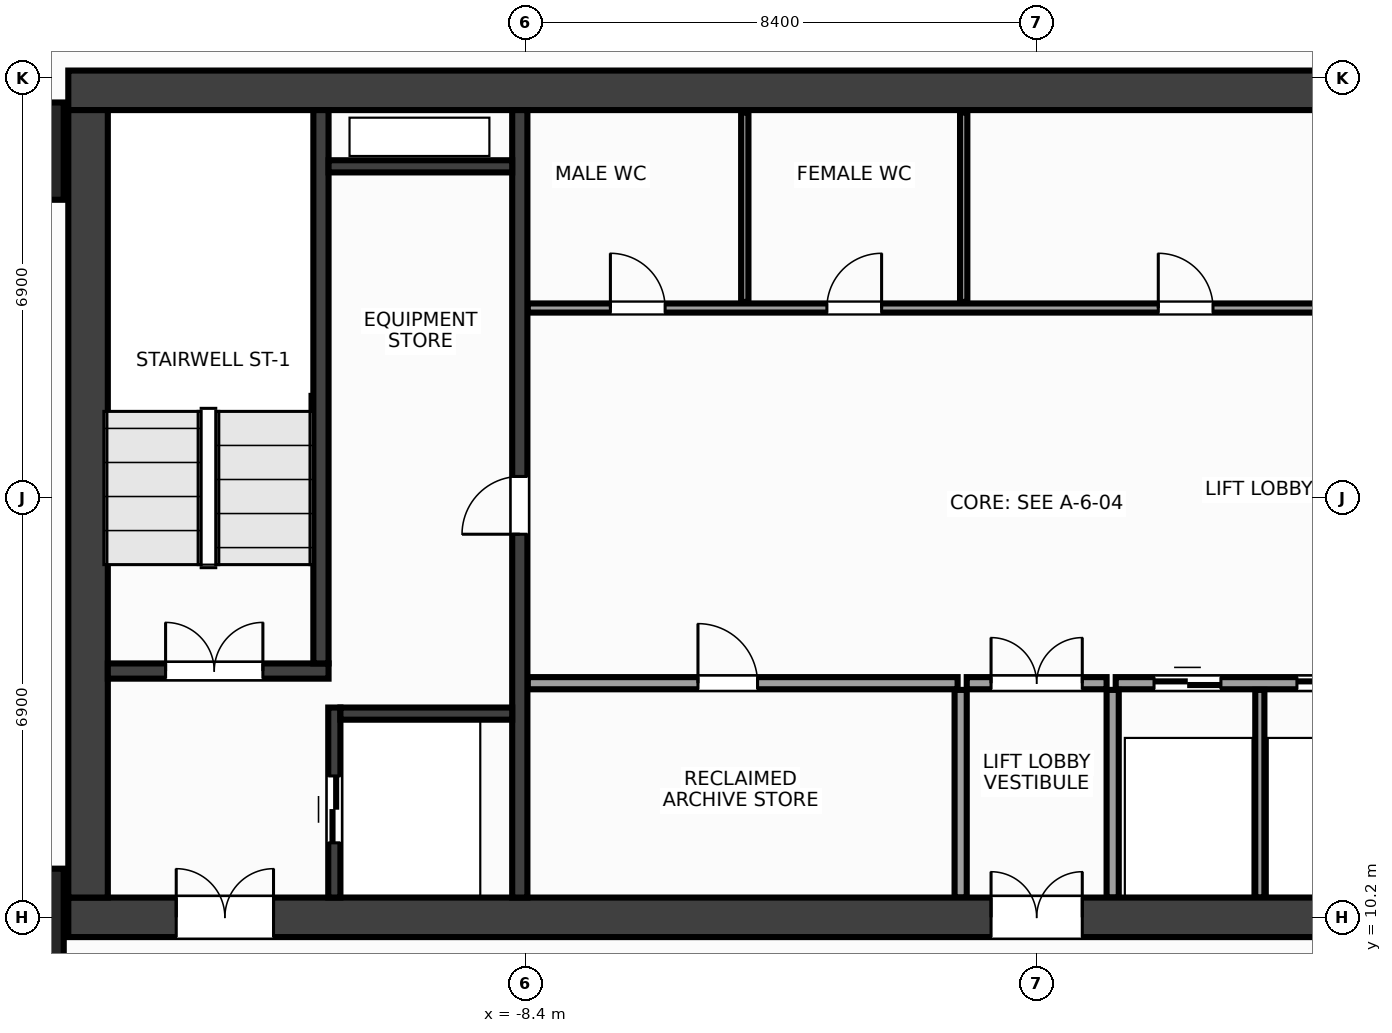
"""IFC4 building model, lengths in metres.
Left out: names, types, materials, properties, quantities, classifications, styles, units other than length and angle.
Written with IfcOpenShell. Run it as: python <this file> out.ifc"""

import sys

from ifc_helpers import new_model, si_unit, direction, frame, frame_2d, origin, origin_2d, place, context, subcontext, project, spatial, rectangle, extrude, source, transform, mapped, element, fill, save


model = new_model("IFC4")
c1 = context("Model", 3, precision=1e-05, world=origin(), true_north=direction((0.0, 1.0)))
c2 = subcontext(c1, "Body", "Model", "MODEL_VIEW")
j1 = project(units=[si_unit("LENGTHUNIT", "METRE"), si_unit("PLANEANGLEUNIT", "RADIAN")], contexts=[c1])
p1 = place(None, origin())
s1 = spatial("IfcSite", under=j1, at=p1, CompositionType="ELEMENT")
p2 = place(p1, origin())
s2 = spatial("IfcBuilding", under=s1, at=p2, CompositionType="ELEMENT")
p3 = place(p2, frame((0.0, 0.0, 102.8)))
s3 = spatial("IfcBuildingStorey", under=s2, at=p3, CompositionType="ELEMENT", Elevation=102.8)
m1 = source(origin(), c2, "Body", "SweptSolid", [
    extrude(rectangle(XDim=31.85, YDim=0.65, at=frame_2d((15.925, 0.0))), origin(), (0.0, 0.0, 1.0), 3.6),
])
p4 = place(p3, frame((-15.925, 23.8, 0.0), z_axis=(0.0, 0.0, 1.0), x_axis=(1.0, 0.0, 0.0)))
e1 = element("IfcWall", 1, at=p4, inside=s3, PredefinedType="SHEAR", context=c2, shape_type="MappedRepresentation", body=[
    mapped(m1, transform((0.0, 0.0, 0.0), x_axis=(1.0, 0.0, 0.0), y_axis=(0.0, 1.0, 0.0), z_axis=(0.0, 0.0, 1.0), scale=1.0)),
])
p5 = place(p3, frame((-15.925, 10.2, 0.0), z_axis=(0.0, 0.0, 1.0), x_axis=(1.0, 0.0, 0.0)))
e2 = element("IfcWall", 2, at=p5, inside=s3, PredefinedType="SHEAR", context=c2, shape_type="MappedRepresentation", body=[
    mapped(m1, transform((0.0, 0.0, 0.0), x_axis=(1.0, 0.0, 0.0), y_axis=(0.0, 1.0, 0.0), z_axis=(0.0, 0.0, 1.0), scale=1.0)),
])
p6 = place(p5, frame((1.775, 0.0, 0.0)))
e3 = element("IfcOpeningElement", 3, at=p6, cuts=e2, PredefinedType="OPENING", context=c2, shape_type="SweptSolid", body=[
    extrude(rectangle(XDim=1.6, YDim=2.15, at=frame_2d((0.8, 1.075))), frame((0.0, 0.337, 0.0), z_axis=(0.0, -1.0, 0.0), x_axis=(1.0, 0.0, 0.0)), (0.0, 0.0, 1.0), 0.674),
])
p7 = place(p5, frame((28.475, 0.0, 0.0)))
e4 = element("IfcOpeningElement", 4, at=p7, cuts=e2, PredefinedType="OPENING", context=c2, shape_type="SweptSolid", body=[
    extrude(rectangle(XDim=1.6, YDim=2.15, at=frame_2d((0.8, 1.075))), frame((0.0, 0.337, 0.0), z_axis=(0.0, -1.0, 0.0), x_axis=(1.0, 0.0, 0.0)), (0.0, 0.0, 1.0), 0.674),
])
p8 = place(p5, frame((15.175, 0.0, 0.0)))
e5 = element("IfcOpeningElement", 5, at=p8, cuts=e2, PredefinedType="OPENING", context=c2, shape_type="SweptSolid", body=[
    extrude(rectangle(XDim=1.5, YDim=2.2, at=frame_2d((0.75, 1.1))), frame((0.0, 0.337, 0.0), z_axis=(0.0, -1.0, 0.0), x_axis=(1.0, 0.0, 0.0)), (0.0, 0.0, 1.0), 0.674),
])
m2 = source(origin(), c2, "Body", "SweptSolid", [
    extrude(rectangle(XDim=12.95, YDim=0.65, at=frame_2d((6.475, 0.0))), origin(), (0.0, 0.0, 1.0), 3.6),
])
p9 = place(p3, frame((-15.6, 10.525, 0.0), z_axis=(0.0, 0.0, 1.0), x_axis=(0.0, 1.0, 0.0)))
e6 = element("IfcWall", 6, at=p9, inside=s3, PredefinedType="SHEAR", context=c2, shape_type="MappedRepresentation", body=[
    mapped(m2, transform((0.0, 0.0, 0.0), x_axis=(1.0, 0.0, 0.0), y_axis=(0.0, 1.0, 0.0), z_axis=(0.0, 0.0, 1.0), scale=1.0)),
])
m3 = source(origin(), c2, "Body", "SweptSolid", [
    extrude(rectangle(XDim=12.95, YDim=0.25, at=frame_2d((6.475, 0.0))), origin(), (0.0, 0.0, 1.0), 3.6),
])
p10 = place(p3, frame((-8.5, 10.525, 0.0), z_axis=(0.0, 0.0, 1.0), x_axis=(0.0, 1.0, 0.0)))
e7 = element("IfcWall", 7, at=p10, inside=s3, PredefinedType="SHEAR", context=c2, shape_type="MappedRepresentation", body=[
    mapped(m3, transform((0.0, 0.0, 0.0), x_axis=(1.0, 0.0, 0.0), y_axis=(0.0, 1.0, 0.0), z_axis=(0.0, 0.0, 1.0), scale=1.0)),
])
p11 = place(p10, frame((5.975, 0.0, 0.0)))
e8 = element("IfcOpeningElement", 8, at=p11, cuts=e7, PredefinedType="OPENING", context=c2, shape_type="SweptSolid", body=[
    extrude(rectangle(XDim=0.95, YDim=2.15, at=frame_2d((0.475, 1.075))), frame((0.0, 0.137, 0.0), z_axis=(0.0, -1.0, 0.0), x_axis=(1.0, 0.0, 0.0)), (0.0, 0.0, 1.0), 0.274),
])
m4 = source(origin(), c2, "Body", "SweptSolid", [
    extrude(rectangle(XDim=3.63, YDim=0.25, at=frame_2d((1.815, 0.0))), origin(), (0.0, 0.0, 1.0), 3.6),
])
p12 = place(p3, frame((-15.275, 14.25, 0.0), z_axis=(0.0, 0.0, 1.0), x_axis=(1.0, 0.0, 0.0)))
e9 = element("IfcWall", 9, at=p12, inside=s3, PredefinedType="SHEAR", context=c2, shape_type="MappedRepresentation", body=[
    mapped(m4, transform((0.0, 0.0, 0.0), x_axis=(1.0, 0.0, 0.0), y_axis=(0.0, 1.0, 0.0), z_axis=(0.0, 0.0, 1.0), scale=1.0)),
])
p13 = place(p12, frame((0.95, 0.0, 0.0)))
e10 = element("IfcOpeningElement", 10, at=p13, cuts=e9, PredefinedType="OPENING", context=c2, shape_type="SweptSolid", body=[
    extrude(rectangle(XDim=1.6, YDim=2.15, at=frame_2d((0.8, 1.075))), frame((0.0, 0.137, 0.0), z_axis=(0.0, -1.0, 0.0), x_axis=(1.0, 0.0, 0.0)), (0.0, 0.0, 1.0), 0.274),
])
m5 = source(origin(), c2, "Body", "SweptSolid", [
    extrude(rectangle(XDim=9.1, YDim=0.25, at=frame_2d((4.55, 0.0))), origin(), (0.0, 0.0, 1.0), 3.6),
])
p14 = place(p3, frame((-11.77, 14.375, 0.0), z_axis=(0.0, 0.0, 1.0), x_axis=(0.0, 1.0, 0.0)))
e11 = element("IfcWall", 11, at=p14, inside=s3, PredefinedType="SHEAR", context=c2, shape_type="MappedRepresentation", body=[
    mapped(m5, transform((0.0, 0.0, 0.0), x_axis=(1.0, 0.0, 0.0), y_axis=(0.0, 1.0, 0.0), z_axis=(0.0, 0.0, 1.0), scale=1.0)),
])
m6 = source(origin(), c2, "Body", "SweptSolid", [
    extrude(rectangle(XDim=3.125, YDim=0.2, at=frame_2d((1.562, 0.0))), origin(), (0.0, 0.0, 1.0), 3.6),
])
p15 = place(p3, frame((-11.55, 10.525, 0.0), z_axis=(0.0, 0.0, 1.0), x_axis=(0.0, 1.0, 0.0)))
e12 = element("IfcWall", 12, at=p15, inside=s3, PredefinedType="SHEAR", context=c2, shape_type="MappedRepresentation", body=[
    mapped(m6, transform((0.0, 0.0, 0.0), x_axis=(1.0, 0.0, 0.0), y_axis=(0.0, 1.0, 0.0), z_axis=(0.0, 0.0, 1.0), scale=1.0)),
])
p16 = place(p15, frame((0.9, 0.0, 0.0)))
e13 = element("IfcOpeningElement", 13, at=p16, cuts=e12, PredefinedType="OPENING", context=c2, shape_type="SweptSolid", body=[
    extrude(rectangle(XDim=1.1, YDim=2.15, at=frame_2d((0.55, 1.075))), frame((0.0, 0.112, 0.0), z_axis=(0.0, -1.0, 0.0), x_axis=(1.0, 0.0, 0.0)), (0.0, 0.0, 1.0), 0.224),
])
m7 = source(origin(), c2, "Body", "SweptSolid", [
    extrude(rectangle(XDim=2.825, YDim=0.2, at=frame_2d((1.413, 0.0))), origin(), (0.0, 0.0, 1.0), 3.6),
])
p17 = place(p3, frame((-11.45, 13.55, 0.0), z_axis=(0.0, 0.0, 1.0), x_axis=(1.0, 0.0, 0.0)))
e14 = element("IfcWall", 14, at=p17, inside=s3, PredefinedType="SHEAR", context=c2, shape_type="MappedRepresentation", body=[
    mapped(m7, transform((0.0, 0.0, 0.0), x_axis=(1.0, 0.0, 0.0), y_axis=(0.0, 1.0, 0.0), z_axis=(0.0, 0.0, 1.0), scale=1.0)),
])
m8 = source(origin(), c2, "Body", "SweptSolid", [
    extrude(rectangle(XDim=3.02, YDim=0.2, at=frame_2d((1.51, 0.0))), origin(), (0.0, 0.0, 1.0), 3.6),
])
p18 = place(p3, frame((-11.645, 22.55, 0.0), z_axis=(0.0, 0.0, 1.0), x_axis=(1.0, 0.0, 0.0)))
e15 = element("IfcWall", 15, at=p18, inside=s3, PredefinedType="SHEAR", context=c2, shape_type="MappedRepresentation", body=[
    mapped(m8, transform((0.0, 0.0, 0.0), x_axis=(1.0, 0.0, 0.0), y_axis=(0.0, 1.0, 0.0), z_axis=(0.0, 0.0, 1.0), scale=1.0)),
])
m9 = source(origin(), c2, "Body", "SweptSolid", [
    extrude(rectangle(XDim=1.6, YDim=1.6, at=origin_2d()), origin(), (0.0, 0.0, 1.0), 3.6),
])
for number, where, z_axis, x_axis in (
    (16, (-16.8, 10.2, 0.0), (0.0, 0.0, 1.0), (1.0, 0.0, 0.0)),
    (17, (-16.8, 22.8, 0.0), (0.0, 0.0, 1.0), (1.0, 0.0, 0.0)),
):
    element("IfcColumn", number, at=place(p3, frame(where, z_axis=z_axis, x_axis=x_axis)), inside=s3, PredefinedType="COLUMN", context=c2, shape_type="MappedRepresentation", body=[
        mapped(m9, transform((0.0, 0.0, 0.0), x_axis=(1.0, 0.0, 0.0), y_axis=(0.0, 1.0, 0.0), z_axis=(0.0, 0.0, 1.0), scale=1.0)),
    ])
m10 = source(origin(), c2, "Body", "SweptSolid", [
    extrude(rectangle(XDim=7.07, YDim=0.2, at=frame_2d((3.535, 0.0))), origin(), (0.0, 0.0, 1.0), 3.36),
])
p19 = place(p3, frame((-8.37, 14.05, 0.0), z_axis=(0.0, 0.0, 1.0), x_axis=(1.0, 0.0, 0.0)))
e18 = element("IfcWall", 18, at=p19, inside=s3, PredefinedType="PARTITIONING", context=c2, shape_type="MappedRepresentation", body=[
    mapped(m10, transform((0.0, 0.0, 0.0), x_axis=(1.0, 0.0, 0.0), y_axis=(0.0, 1.0, 0.0), z_axis=(0.0, 0.0, 1.0), scale=1.0)),
])
p20 = place(p19, frame((2.8, 0.0, 0.0)))
e19 = element("IfcOpeningElement", 19, at=p20, cuts=e18, PredefinedType="OPENING", context=c2, shape_type="SweptSolid", body=[
    extrude(rectangle(XDim=0.98, YDim=2.15, at=frame_2d((0.49, 1.075))), frame((0.0, 0.112, 0.0), z_axis=(0.0, -1.0, 0.0), x_axis=(1.0, 0.0, 0.0)), (0.0, 0.0, 1.0), 0.224),
])
p21 = place(p3, frame((1.3, 14.05, 0.0), z_axis=(0.0, 0.0, 1.0), x_axis=(1.0, 0.0, 0.0)))
e20 = element("IfcWall", 20, at=p21, inside=s3, PredefinedType="PARTITIONING", context=c2, shape_type="MappedRepresentation", body=[
    mapped(m10, transform((0.0, 0.0, 0.0), x_axis=(1.0, 0.0, 0.0), y_axis=(0.0, 1.0, 0.0), z_axis=(0.0, 0.0, 1.0), scale=1.0)),
])
p22 = place(p21, frame((0.63, 0.0, 0.0)))
e21 = element("IfcOpeningElement", 21, at=p22, cuts=e20, PredefinedType="OPENING", context=c2, shape_type="SweptSolid", body=[
    extrude(rectangle(XDim=1.1, YDim=2.15, at=frame_2d((0.55, 1.075))), frame((0.0, 0.112, 0.0), z_axis=(0.0, -1.0, 0.0), x_axis=(1.0, 0.0, 0.0)), (0.0, 0.0, 1.0), 0.224),
])
p23 = place(p21, frame((2.98, 0.0, 0.0)))
e22 = element("IfcOpeningElement", 22, at=p23, cuts=e20, PredefinedType="OPENING", context=c2, shape_type="SweptSolid", body=[
    extrude(rectangle(XDim=1.1, YDim=2.15, at=frame_2d((0.55, 1.075))), frame((0.0, 0.112, 0.0), z_axis=(0.0, -1.0, 0.0), x_axis=(1.0, 0.0, 0.0)), (0.0, 0.0, 1.0), 0.224),
])
p24 = place(p21, frame((5.33, 0.0, 0.0)))
e23 = element("IfcOpeningElement", 23, at=p24, cuts=e20, PredefinedType="OPENING", context=c2, shape_type="SweptSolid", body=[
    extrude(rectangle(XDim=1.1, YDim=2.15, at=frame_2d((0.55, 1.075))), frame((0.0, 0.112, 0.0), z_axis=(0.0, -1.0, 0.0), x_axis=(1.0, 0.0, 0.0)), (0.0, 0.0, 1.0), 0.224),
])
m11 = source(origin(), c2, "Body", "SweptSolid", [
    extrude(rectangle(XDim=3.415, YDim=0.2, at=frame_2d((1.708, 0.0))), origin(), (0.0, 0.0, 1.0), 3.36),
])
for number, where, z_axis, x_axis in (
    (24, (-1.25, 10.525, 0.0), (0.0, 0.0, 1.0), (0.0, 1.0, 0.0)),
    (25, (1.25, 10.525, 0.0), (0.0, 0.0, 1.0), (0.0, 1.0, 0.0)),
):
    element("IfcWall", number, at=place(p3, frame(where, z_axis=z_axis, x_axis=x_axis)), inside=s3, PredefinedType="PARTITIONING", context=c2, shape_type="MappedRepresentation", body=[
        mapped(m11, transform((0.0, 0.0, 0.0), x_axis=(1.0, 0.0, 0.0), y_axis=(0.0, 1.0, 0.0), z_axis=(0.0, 0.0, 1.0), scale=1.0)),
    ])
m12 = source(origin(), c2, "Body", "SweptSolid", [
    extrude(rectangle(XDim=2.3, YDim=0.2, at=frame_2d((1.15, 0.0))), origin(), (0.0, 0.0, 1.0), 3.36),
])
p25 = place(p3, frame((-1.15, 14.05, 0.0), z_axis=(0.0, 0.0, 1.0), x_axis=(1.0, 0.0, 0.0)))
e26 = element("IfcWall", 26, at=p25, inside=s3, PredefinedType="PARTITIONING", context=c2, shape_type="MappedRepresentation", body=[
    mapped(m12, transform((0.0, 0.0, 0.0), x_axis=(1.0, 0.0, 0.0), y_axis=(0.0, 1.0, 0.0), z_axis=(0.0, 0.0, 1.0), scale=1.0)),
])
p26 = place(p25, frame((0.4, 0.0, 0.0)))
e27 = element("IfcOpeningElement", 27, at=p26, cuts=e26, PredefinedType="OPENING", context=c2, shape_type="SweptSolid", body=[
    extrude(rectangle(XDim=1.5, YDim=2.2, at=frame_2d((0.75, 1.1))), frame((0.0, 0.112, 0.0), z_axis=(0.0, -1.0, 0.0), x_axis=(1.0, 0.0, 0.0)), (0.0, 0.0, 1.0), 0.224),
])
m13 = source(origin(), c2, "Body", "SweptSolid", [
    extrude(rectangle(XDim=14.59, YDim=0.15, at=frame_2d((7.295, 0.0))), origin(), (0.0, 0.0, 1.0), 3.36),
])
p27 = place(p3, frame((-8.37, 20.22, 0.0), z_axis=(0.0, 0.0, 1.0), x_axis=(1.0, 0.0, 0.0)))
e28 = element("IfcWall", 28, at=p27, inside=s3, PredefinedType="PARTITIONING", context=c2, shape_type="MappedRepresentation", body=[
    mapped(m13, transform((0.0, 0.0, 0.0), x_axis=(1.0, 0.0, 0.0), y_axis=(0.0, 1.0, 0.0), z_axis=(0.0, 0.0, 1.0), scale=1.0)),
])
p28 = place(p27, frame((1.36, 0.0, 0.0)))
e29 = element("IfcOpeningElement", 29, at=p28, cuts=e28, PredefinedType="OPENING", context=c2, shape_type="SweptSolid", body=[
    extrude(rectangle(XDim=0.9, YDim=2.15, at=frame_2d((0.45, 1.075))), frame((0.0, 0.087, 0.0), z_axis=(0.0, -1.0, 0.0), x_axis=(1.0, 0.0, 0.0)), (0.0, 0.0, 1.0), 0.174),
])
p29 = place(p27, frame((4.92, 0.0, 0.0)))
e30 = element("IfcOpeningElement", 30, at=p29, cuts=e28, PredefinedType="OPENING", context=c2, shape_type="SweptSolid", body=[
    extrude(rectangle(XDim=0.9, YDim=2.15, at=frame_2d((0.45, 1.075))), frame((0.0, 0.087, 0.0), z_axis=(0.0, -1.0, 0.0), x_axis=(1.0, 0.0, 0.0)), (0.0, 0.0, 1.0), 0.174),
])
p30 = place(p27, frame((10.37, 0.0, 0.0)))
e31 = element("IfcOpeningElement", 31, at=p30, cuts=e28, PredefinedType="OPENING", context=c2, shape_type="SweptSolid", body=[
    extrude(rectangle(XDim=0.9, YDim=2.15, at=frame_2d((0.45, 1.075))), frame((0.0, 0.087, 0.0), z_axis=(0.0, -1.0, 0.0), x_axis=(1.0, 0.0, 0.0)), (0.0, 0.0, 1.0), 0.174),
])
m14 = source(origin(), c2, "Body", "SweptSolid", [
    extrude(rectangle(XDim=3.415, YDim=0.15, at=frame_2d((1.708, 0.0))), origin(), (0.0, 0.0, 1.0), 3.36),
])
p31 = place(p3, frame((3.67, 10.525, 0.0), z_axis=(0.0, 0.0, 1.0), x_axis=(0.0, 1.0, 0.0)))
e32 = element("IfcWall", 32, at=p31, inside=s3, PredefinedType="PARTITIONING", context=c2, shape_type="MappedRepresentation", body=[
    mapped(m14, transform((0.0, 0.0, 0.0), x_axis=(1.0, 0.0, 0.0), y_axis=(0.0, 1.0, 0.0), z_axis=(0.0, 0.0, 1.0), scale=1.0)),
])
m15 = source(origin(), c2, "Body", "SweptSolid", [
    extrude(rectangle(XDim=3.115, YDim=0.12, at=frame_2d((1.558, 0.0))), origin(), (0.0, 0.0, 1.0), 3.36),
])
for number, where, z_axis, x_axis in (
    (33, (-4.8, 20.32, 0.0), (0.0, 0.0, 1.0), (0.0, 1.0, 0.0)),
    (34, (-1.2, 20.32, 0.0), (0.0, 0.0, 1.0), (0.0, 1.0, 0.0)),
):
    element("IfcWall", number, at=place(p3, frame(where, z_axis=z_axis, x_axis=x_axis)), inside=s3, PredefinedType="PARTITIONING", context=c2, shape_type="MappedRepresentation", body=[
        mapped(m15, transform((0.0, 0.0, 0.0), x_axis=(1.0, 0.0, 0.0), y_axis=(0.0, 1.0, 0.0), z_axis=(0.0, 0.0, 1.0), scale=1.0)),
    ])
m16 = source(origin(), c2, "Body", "SweptSolid", [
    extrude(rectangle(XDim=1.6, YDim=2.15, at=frame_2d((0.8, 1.075))), frame((0.0, 0.025, 0.0), z_axis=(0.0, -1.0, 0.0), x_axis=(1.0, 0.0, 0.0)), (0.0, 0.0, 1.0), 0.05),
])
p32 = place(p13, origin())
e35 = element("IfcDoor", 35, at=p32, inside=s3, OperationType="DOUBLE_DOOR_SINGLE_SWING", PredefinedType="DOOR", context=c2, shape_type="MappedRepresentation", body=[
    mapped(m16, transform((0.0, 0.0, 0.0), x_axis=(1.0, 0.0, 0.0), y_axis=(0.0, 1.0, 0.0), z_axis=(0.0, 0.0, 1.0), scale=1.0)),
])
fill(e10, e35)
p33 = place(p6, origin())
e36 = element("IfcDoor", 36, at=p33, inside=s3, OperationType="DOUBLE_DOOR_SINGLE_SWING", PredefinedType="DOOR", context=c2, shape_type="MappedRepresentation", body=[
    mapped(m16, transform((0.0, 0.0, 0.0), x_axis=(1.0, 0.0, 0.0), y_axis=(0.0, 1.0, 0.0), z_axis=(0.0, 0.0, 1.0), scale=1.0)),
])
fill(e3, e36)
m17 = source(origin(), c2, "Body", "SweptSolid", [
    extrude(rectangle(XDim=1.1, YDim=2.15, at=frame_2d((0.55, 1.075))), frame((0.0, 0.025, 0.0), z_axis=(0.0, -1.0, 0.0), x_axis=(1.0, 0.0, 0.0)), (0.0, 0.0, 1.0), 0.05),
])
p34 = place(p16, origin())
e37 = element("IfcDoor", 37, at=p34, inside=s3, OperationType="DOUBLE_DOOR_SLIDING", PredefinedType="DOOR", context=c2, shape_type="MappedRepresentation", body=[
    mapped(m17, transform((0.0, 0.0, 0.0), x_axis=(1.0, 0.0, 0.0), y_axis=(0.0, 1.0, 0.0), z_axis=(0.0, 0.0, 1.0), scale=1.0)),
])
fill(e13, e37)
m18 = source(origin(), c2, "Body", "SweptSolid", [
    extrude(rectangle(XDim=0.95, YDim=2.15, at=frame_2d((0.475, 1.075))), frame((0.0, 0.025, 0.0), z_axis=(0.0, -1.0, 0.0), x_axis=(1.0, 0.0, 0.0)), (0.0, 0.0, 1.0), 0.05),
])
p35 = place(p11, origin())
e38 = element("IfcDoor", 38, at=p35, inside=s3, OperationType="SINGLE_SWING_LEFT", PredefinedType="DOOR", context=c2, shape_type="MappedRepresentation", body=[
    mapped(m18, transform((0.0, 0.0, 0.0), x_axis=(1.0, 0.0, 0.0), y_axis=(0.0, 1.0, 0.0), z_axis=(0.0, 0.0, 1.0), scale=1.0)),
])
fill(e8, e38)
m19 = source(origin(), c2, "Body", "SweptSolid", [
    extrude(rectangle(XDim=0.98, YDim=2.15, at=frame_2d((0.49, 1.075))), frame((0.0, 0.025, 0.0), z_axis=(0.0, -1.0, 0.0), x_axis=(1.0, 0.0, 0.0)), (0.0, 0.0, 1.0), 0.05),
])
p36 = place(p20, origin())
e39 = element("IfcDoor", 39, at=p36, inside=s3, OperationType="SINGLE_SWING_LEFT", PredefinedType="DOOR", context=c2, shape_type="MappedRepresentation", body=[
    mapped(m19, transform((0.0, 0.0, 0.0), x_axis=(1.0, 0.0, 0.0), y_axis=(0.0, 1.0, 0.0), z_axis=(0.0, 0.0, 1.0), scale=1.0)),
])
fill(e19, e39)
p37 = place(p22, origin())
e40 = element("IfcDoor", 40, at=p37, inside=s3, OperationType="DOUBLE_DOOR_SLIDING", PredefinedType="DOOR", context=c2, shape_type="MappedRepresentation", body=[
    mapped(m17, transform((0.0, 0.0, 0.0), x_axis=(1.0, 0.0, 0.0), y_axis=(0.0, 1.0, 0.0), z_axis=(0.0, 0.0, 1.0), scale=1.0)),
])
fill(e21, e40)
p38 = place(p23, origin())
e41 = element("IfcDoor", 41, at=p38, inside=s3, OperationType="DOUBLE_DOOR_SLIDING", PredefinedType="DOOR", context=c2, shape_type="MappedRepresentation", body=[
    mapped(m17, transform((0.0, 0.0, 0.0), x_axis=(1.0, 0.0, 0.0), y_axis=(0.0, 1.0, 0.0), z_axis=(0.0, 0.0, 1.0), scale=1.0)),
])
fill(e22, e41)
m20 = source(origin(), c2, "Body", "SweptSolid", [
    extrude(rectangle(XDim=1.5, YDim=2.2, at=frame_2d((0.75, 1.1))), frame((0.0, 0.025, 0.0), z_axis=(0.0, -1.0, 0.0), x_axis=(1.0, 0.0, 0.0)), (0.0, 0.0, 1.0), 0.05),
])
p39 = place(p26, origin())
e42 = element("IfcDoor", 42, at=p39, inside=s3, OperationType="DOUBLE_DOOR_SINGLE_SWING", PredefinedType="DOOR", context=c2, shape_type="MappedRepresentation", body=[
    mapped(m20, transform((0.0, 0.0, 0.0), x_axis=(1.0, 0.0, 0.0), y_axis=(0.0, 1.0, 0.0), z_axis=(0.0, 0.0, 1.0), scale=1.0)),
])
fill(e27, e42)
p40 = place(p8, origin())
e43 = element("IfcDoor", 43, at=p40, inside=s3, OperationType="DOUBLE_DOOR_SINGLE_SWING", PredefinedType="DOOR", context=c2, shape_type="MappedRepresentation", body=[
    mapped(m20, transform((0.0, 0.0, 0.0), x_axis=(1.0, 0.0, 0.0), y_axis=(0.0, 1.0, 0.0), z_axis=(0.0, 0.0, 1.0), scale=1.0)),
])
fill(e5, e43)
m21 = source(origin(), c2, "Body", "SweptSolid", [
    extrude(rectangle(XDim=0.9, YDim=2.15, at=frame_2d((0.45, 1.075))), frame((0.0, 0.025, 0.0), z_axis=(0.0, -1.0, 0.0), x_axis=(1.0, 0.0, 0.0)), (0.0, 0.0, 1.0), 0.05),
])
p41 = place(p28, origin())
e44 = element("IfcDoor", 44, at=p41, inside=s3, OperationType="SINGLE_SWING_LEFT", PredefinedType="DOOR", context=c2, shape_type="MappedRepresentation", body=[
    mapped(m21, transform((0.0, 0.0, 0.0), x_axis=(1.0, 0.0, 0.0), y_axis=(0.0, 1.0, 0.0), z_axis=(0.0, 0.0, 1.0), scale=1.0)),
])
fill(e29, e44)
p42 = place(p29, origin())
e45 = element("IfcDoor", 45, at=p42, inside=s3, OperationType="SINGLE_SWING_RIGHT", PredefinedType="DOOR", context=c2, shape_type="MappedRepresentation", body=[
    mapped(m21, transform((0.0, 0.0, 0.0), x_axis=(1.0, 0.0, 0.0), y_axis=(0.0, 1.0, 0.0), z_axis=(0.0, 0.0, 1.0), scale=1.0)),
])
fill(e30, e45)
p43 = place(p30, origin())
e46 = element("IfcDoor", 46, at=p43, inside=s3, OperationType="SINGLE_SWING_LEFT", PredefinedType="DOOR", context=c2, shape_type="MappedRepresentation", body=[
    mapped(m21, transform((0.0, 0.0, 0.0), x_axis=(1.0, 0.0, 0.0), y_axis=(0.0, 1.0, 0.0), z_axis=(0.0, 0.0, 1.0), scale=1.0)),
])
fill(e31, e46)
save(model, sys.argv[1])
